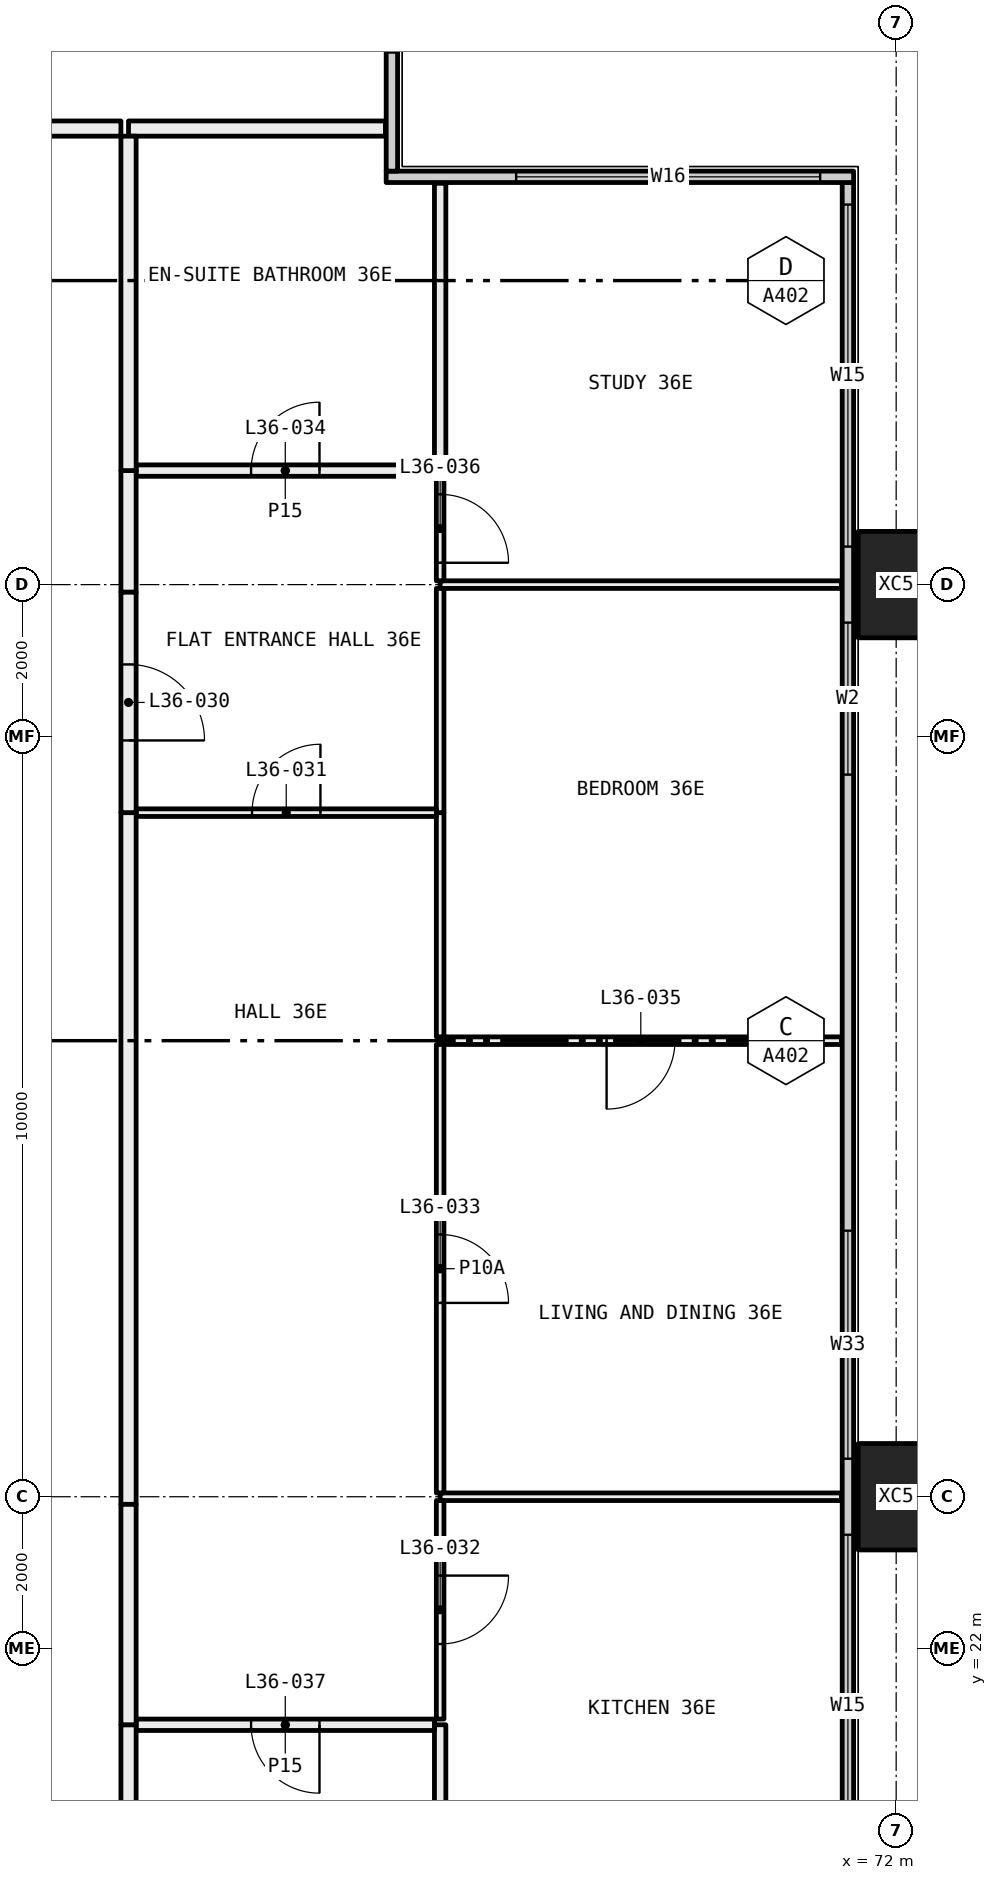
"""IFC4 building model, lengths in metres.
Left out: names, types, materials, properties, quantities, classifications, styles, units other than length and angle.
Written with IfcOpenShell. Run it as: python <this file> out.ifc"""

import sys

from ifc_helpers import new_model, si_unit, direction, frame, frame_2d, origin, origin_2d, place, context, subcontext, project, spatial, rectangle, hollow_rectangle, extrude, element, fill, save


model = new_model("IFC4")
c1 = context("Model", 3, precision=1e-05, world=origin(), true_north=direction((0.0, 1.0)))
c2 = subcontext(c1, "Body", "Model", "MODEL_VIEW")
j1 = project(units=[si_unit("LENGTHUNIT", "METRE"), si_unit("PLANEANGLEUNIT", "RADIAN")], contexts=[c1])
p1 = place(None, origin())
s1 = spatial("IfcSite", under=j1, at=p1, CompositionType="ELEMENT")
p2 = place(p1, origin())
s2 = spatial("IfcBuilding", under=s1, at=p2, CompositionType="ELEMENT")
p3 = place(p2, frame((0.0, 0.0, 138.0)))
s3 = spatial("IfcBuildingStorey", under=s2, at=p3, CompositionType="ELEMENT", Elevation=138.0)
for number, where, z_axis, x_axis in (
    (1, (72.0, 24.0, -0.4), (0.0, 0.0, 1.0), (0.0, 1.0, 0.0)),
    (2, (72.0, 36.0, -0.4), (0.0, 0.0, 1.0), (0.0, 1.0, 0.0)),
):
    element("IfcColumn", number, at=place(p3, frame(where, z_axis=z_axis, x_axis=x_axis)), inside=s3, PredefinedType="COLUMN", context=c2, shape_type="SweptSolid", body=[
        extrude(hollow_rectangle(XDim=1.4, YDim=1.0, WallThickness=0.055, at=origin_2d()), origin(), (0.0, 0.0, 1.0), 3.45),
    ])
p4 = place(p3, frame((71.365, 18.71, 0.0), z_axis=(0.0, 0.0, 1.0), x_axis=(0.0, 1.0, 0.0)))
e3 = element("IfcWall", 3, at=p4, inside=s3, PredefinedType="ELEMENTEDWALL", context=c2, shape_type="SweptSolid", body=[
    extrude(rectangle(XDim=22.58, YDim=0.15, at=frame_2d((11.29, 0.0))), origin(), (0.0, 0.0, 1.0), 3.05),
])
p5 = place(p4, frame((0.29, 0.0, 0.45)))
e4 = element("IfcOpeningElement", 4, at=p5, cuts=e3, PredefinedType="OPENING", context=c2, shape_type="SweptSolid", body=[
    extrude(rectangle(XDim=4.5, YDim=2.55, at=frame_2d((2.25, 1.275))), frame((0.0, 0.085, 0.0), z_axis=(0.0, -1.0, 0.0), x_axis=(1.0, 0.0, 0.0)), (0.0, 0.0, 1.0), 0.17),
])
p6 = place(p4, frame((5.79, 0.0, 0.45)))
e5 = element("IfcOpeningElement", 5, at=p6, cuts=e3, PredefinedType="OPENING", context=c2, shape_type="SweptSolid", body=[
    extrude(rectangle(XDim=3.0, YDim=2.55, at=frame_2d((1.5, 1.275))), frame((0.0, 0.085, 0.0), z_axis=(0.0, -1.0, 0.0), x_axis=(1.0, 0.0, 0.0)), (0.0, 0.0, 1.0), 0.17),
])
p7 = place(p4, frame((14.79, 0.0, 0.45)))
e6 = element("IfcOpeningElement", 6, at=p7, cuts=e3, PredefinedType="OPENING", context=c2, shape_type="SweptSolid", body=[
    extrude(rectangle(XDim=2.0, YDim=2.55, at=frame_2d((1.0, 1.275))), frame((0.0, 0.085, 0.0), z_axis=(0.0, -1.0, 0.0), x_axis=(1.0, 0.0, 0.0)), (0.0, 0.0, 1.0), 0.17),
])
p8 = place(p4, frame((17.79, 0.0, 0.45)))
e7 = element("IfcOpeningElement", 7, at=p8, cuts=e3, PredefinedType="OPENING", context=c2, shape_type="SweptSolid", body=[
    extrude(rectangle(XDim=4.5, YDim=2.55, at=frame_2d((2.25, 1.275))), frame((0.0, 0.085, 0.0), z_axis=(0.0, -1.0, 0.0), x_axis=(1.0, 0.0, 0.0)), (0.0, 0.0, 1.0), 0.17),
])
p9 = place(p3, frame((65.29, 41.365, 0.0), z_axis=(0.0, 0.0, 1.0), x_axis=(1.0, 0.0, 0.0)))
e8 = element("IfcWall", 8, at=p9, inside=s3, PredefinedType="ELEMENTEDWALL", context=c2, shape_type="SweptSolid", body=[
    extrude(rectangle(XDim=6.15, YDim=0.15, at=frame_2d((3.075, 0.0))), origin(), (0.0, 0.0, 1.0), 3.05),
])
p10 = place(p9, frame((1.71, 0.0, 0.45)))
e9 = element("IfcOpeningElement", 9, at=p10, cuts=e8, PredefinedType="OPENING", context=c2, shape_type="SweptSolid", body=[
    extrude(rectangle(XDim=4.0, YDim=2.55, at=frame_2d((2.0, 1.275))), frame((0.0, 0.085, 0.0), z_axis=(0.0, -1.0, 0.0), x_axis=(1.0, 0.0, 0.0)), (0.0, 0.0, 1.0), 0.17),
])
p11 = place(p3, frame((65.365, 41.44, 0.0), z_axis=(0.0, 0.0, 1.0), x_axis=(0.0, 1.0, 0.0)))
e10 = element("IfcWall", 10, at=p11, inside=s3, PredefinedType="ELEMENTEDWALL", context=c2, shape_type="SweptSolid", body=[
    extrude(rectangle(XDim=5.85, YDim=0.15, at=frame_2d((2.925, 0.0))), origin(), (0.0, 0.0, 1.0), 3.05),
])
p12 = place(p11, frame((1.56, 0.0, 0.45)))
e11 = element("IfcOpeningElement", 11, at=p12, cuts=e10, PredefinedType="OPENING", context=c2, shape_type="SweptSolid", body=[
    extrude(rectangle(XDim=4.0, YDim=2.55, at=frame_2d((2.0, 1.275))), frame((0.0, 0.085, 0.0), z_axis=(0.0, -1.0, 0.0), x_axis=(1.0, 0.0, 0.0)), (0.0, 0.0, 1.0), 0.17),
])
p13 = place(p3, frame((71.28, 24.0, 0.0), z_axis=(0.0, 0.0, 1.0), x_axis=(-1.0, 0.0, 0.0)))
e12 = element("IfcWall", 12, at=p13, inside=s3, PredefinedType="PARTITIONING", context=c2, shape_type="SweptSolid", body=[
    extrude(rectangle(XDim=5.28, YDim=0.1, at=frame_2d((2.64, 0.0))), origin(), (0.0, 0.0, 1.0), 2.45),
])
p14 = place(p3, frame((66.0, 21.0, 0.0), z_axis=(0.0, 0.0, 1.0), x_axis=(0.0, -1.0, 0.0)))
e13 = element("IfcWall", 13, at=p14, inside=s3, PredefinedType="PARTITIONING", context=c2, shape_type="SweptSolid", body=[
    extrude(rectangle(XDim=2.28, YDim=0.15, at=frame_2d((1.14, 0.0))), origin(), (0.0, 0.0, 1.0), 3.05),
])
p15 = place(p3, frame((66.0, 23.95, 0.0), z_axis=(0.0, 0.0, 1.0), x_axis=(0.0, -1.0, 0.0)))
e14 = element("IfcWall", 14, at=p15, inside=s3, PredefinedType="PARTITIONING", context=c2, shape_type="SweptSolid", body=[
    extrude(rectangle(XDim=2.875, YDim=0.1, at=frame_2d((1.438, 0.0))), origin(), (0.0, 0.0, 1.0), 2.45),
])
p16 = place(p15, frame((0.988, 0.0, 0.0)))
e15 = element("IfcOpeningElement", 15, at=p16, cuts=e14, PredefinedType="OPENING", context=c2, shape_type="SweptSolid", body=[
    extrude(rectangle(XDim=0.9, YDim=2.1, at=frame_2d((0.45, 1.05))), frame((0.0, 0.06, 0.0), z_axis=(0.0, -1.0, 0.0), x_axis=(1.0, 0.0, 0.0)), (0.0, 0.0, 1.0), 0.12),
])
p17 = place(p3, frame((71.28, 30.0, 0.0), z_axis=(0.0, 0.0, 1.0), x_axis=(-1.0, 0.0, 0.0)))
e16 = element("IfcWall", 16, at=p17, inside=s3, PredefinedType="PARTITIONING", context=c2, shape_type="SweptSolid", body=[
    extrude(rectangle(XDim=5.28, YDim=0.1, at=frame_2d((2.64, 0.0))), origin(), (0.0, 0.0, 1.0), 3.05),
])
p18 = place(p17, frame((2.19, 0.0, 0.0)))
e17 = element("IfcOpeningElement", 17, at=p18, cuts=e16, PredefinedType="OPENING", context=c2, shape_type="SweptSolid", body=[
    extrude(rectangle(XDim=0.9, YDim=2.1, at=frame_2d((0.45, 1.05))), frame((0.0, 0.06, 0.0), z_axis=(0.0, -1.0, 0.0), x_axis=(1.0, 0.0, 0.0)), (0.0, 0.0, 1.0), 0.12),
])
p19 = place(p3, frame((66.0, 29.95, 0.0), z_axis=(0.0, 0.0, 1.0), x_axis=(0.0, -1.0, 0.0)))
e18 = element("IfcWall", 18, at=p19, inside=s3, PredefinedType="PARTITIONING", context=c2, shape_type="SweptSolid", body=[
    extrude(rectangle(XDim=5.9, YDim=0.1, at=frame_2d((2.95, 0.0))), origin(), (0.0, 0.0, 1.0), 2.45),
])
p20 = place(p19, frame((2.5, 0.0, 0.0)))
e19 = element("IfcOpeningElement", 19, at=p20, cuts=e18, PredefinedType="OPENING", context=c2, shape_type="SweptSolid", body=[
    extrude(rectangle(XDim=0.9, YDim=2.1, at=frame_2d((0.45, 1.05))), frame((0.0, 0.06, 0.0), z_axis=(0.0, -1.0, 0.0), x_axis=(1.0, 0.0, 0.0)), (0.0, 0.0, 1.0), 0.12),
])
p21 = place(p3, frame((71.28, 36.0, 0.0), z_axis=(0.0, 0.0, 1.0), x_axis=(-1.0, 0.0, 0.0)))
e20 = element("IfcWall", 20, at=p21, inside=s3, PredefinedType="PARTITIONING", context=c2, shape_type="SweptSolid", body=[
    extrude(rectangle(XDim=5.28, YDim=0.1, at=frame_2d((2.64, 0.0))), origin(), (0.0, 0.0, 1.0), 2.45),
])
p22 = place(p3, frame((66.0, 33.0, 0.0), z_axis=(0.0, 0.0, 1.0), x_axis=(0.0, -1.0, 0.0)))
e21 = element("IfcWall", 21, at=p22, inside=s3, PredefinedType="PARTITIONING", context=c2, shape_type="SweptSolid", body=[
    extrude(rectangle(XDim=2.95, YDim=0.1, at=frame_2d((1.475, 0.0))), origin(), (0.0, 0.0, 1.0), 3.05),
])
p23 = place(p3, frame((66.0, 35.95, 0.0), z_axis=(0.0, 0.0, 1.0), x_axis=(0.0, -1.0, 0.0)))
e22 = element("IfcWall", 22, at=p23, inside=s3, PredefinedType="PARTITIONING", context=c2, shape_type="SweptSolid", body=[
    extrude(rectangle(XDim=2.95, YDim=0.1, at=frame_2d((1.475, 0.0))), origin(), (0.0, 0.0, 1.0), 2.45),
])
p24 = place(p3, frame((66.0, 37.425, 0.0), z_axis=(0.0, 0.0, 1.0), x_axis=(0.0, -1.0, 0.0)))
e23 = element("IfcWall", 23, at=p24, inside=s3, PredefinedType="PARTITIONING", context=c2, shape_type="SweptSolid", body=[
    extrude(rectangle(XDim=1.375, YDim=0.1, at=frame_2d((0.688, 0.0))), origin(), (0.0, 0.0, 1.0), 2.45),
])
p25 = place(p24, frame((0.238, 0.0, 0.0)))
e24 = element("IfcOpeningElement", 24, at=p25, cuts=e23, PredefinedType="OPENING", context=c2, shape_type="SweptSolid", body=[
    extrude(rectangle(XDim=0.9, YDim=2.1, at=frame_2d((0.45, 1.05))), frame((0.0, 0.06, 0.0), z_axis=(0.0, -1.0, 0.0), x_axis=(1.0, 0.0, 0.0)), (0.0, 0.0, 1.0), 0.12),
])
p26 = place(p3, frame((66.0, 41.28, 0.0), z_axis=(0.0, 0.0, 1.0), x_axis=(0.0, -1.0, 0.0)))
e25 = element("IfcWall", 25, at=p26, inside=s3, PredefinedType="PARTITIONING", context=c2, shape_type="SweptSolid", body=[
    extrude(rectangle(XDim=3.78, YDim=0.15, at=frame_2d((1.89, 0.0))), origin(), (0.0, 0.0, 1.0), 3.05),
])
p27 = place(p3, frame((65.925, 21.0, 0.0), z_axis=(0.0, 0.0, 1.0), x_axis=(-1.0, 0.0, 0.0)))
e26 = element("IfcWall", 26, at=p27, inside=s3, PredefinedType="PARTITIONING", context=c2, shape_type="SweptSolid", body=[
    extrude(rectangle(XDim=3.925, YDim=0.15, at=frame_2d((1.962, 0.0))), origin(), (0.0, 0.0, 1.0), 3.05),
])
p28 = place(p27, frame((1.512, 0.0, 0.0)))
e27 = element("IfcOpeningElement", 27, at=p28, cuts=e26, PredefinedType="OPENING", context=c2, shape_type="SweptSolid", body=[
    extrude(rectangle(XDim=0.9, YDim=2.1, at=frame_2d((0.45, 1.05))), frame((0.0, 0.085, 0.0), z_axis=(0.0, -1.0, 0.0), x_axis=(1.0, 0.0, 0.0)), (0.0, 0.0, 1.0), 0.17),
])
p29 = place(p3, frame((61.9, 21.0, 0.0), z_axis=(0.0, 0.0, 1.0), x_axis=(0.0, -1.0, 0.0)))
e28 = element("IfcWall", 28, at=p29, inside=s3, PredefinedType="PARTITIONING", context=c2, shape_type="SweptSolid", body=[
    extrude(rectangle(XDim=2.9, YDim=0.2, at=frame_2d((1.45, 0.0))), origin(), (0.0, 0.0, 1.0), 3.05),
])
p30 = place(p3, frame((65.95, 33.0, 0.0), z_axis=(0.0, 0.0, 1.0), x_axis=(-1.0, 0.0, 0.0)))
e29 = element("IfcWall", 29, at=p30, inside=s3, PredefinedType="PARTITIONING", context=c2, shape_type="SweptSolid", body=[
    extrude(rectangle(XDim=3.95, YDim=0.1, at=frame_2d((1.975, 0.0))), origin(), (0.0, 0.0, 1.0), 3.05),
])
p31 = place(p30, frame((1.525, 0.0, 0.0)))
e30 = element("IfcOpeningElement", 30, at=p31, cuts=e29, PredefinedType="OPENING", context=c2, shape_type="SweptSolid", body=[
    extrude(rectangle(XDim=0.9, YDim=2.1, at=frame_2d((0.45, 1.05))), frame((0.0, 0.06, 0.0), z_axis=(0.0, -1.0, 0.0), x_axis=(1.0, 0.0, 0.0)), (0.0, 0.0, 1.0), 0.12),
])
p32 = place(p3, frame((61.9, 33.0, 0.0), z_axis=(0.0, 0.0, 1.0), x_axis=(0.0, -1.0, 0.0)))
e31 = element("IfcWall", 31, at=p32, inside=s3, PredefinedType="PARTITIONING", context=c2, shape_type="SweptSolid", body=[
    extrude(rectangle(XDim=9.1, YDim=0.2, at=frame_2d((4.55, 0.0))), origin(), (0.0, 0.0, 1.0), 2.45),
])
p33 = place(p3, frame((61.9, 23.9, 0.0), z_axis=(0.0, 0.0, 1.0), x_axis=(0.0, -1.0, 0.0)))
e32 = element("IfcWall", 32, at=p33, inside=s3, PredefinedType="PARTITIONING", context=c2, shape_type="SweptSolid", body=[
    extrude(rectangle(XDim=2.9, YDim=0.2, at=frame_2d((1.45, 0.0))), origin(), (0.0, 0.0, 1.0), 3.05),
])
p34 = place(p3, frame((65.925, 37.5, 0.0), z_axis=(0.0, 0.0, 1.0), x_axis=(-1.0, 0.0, 0.0)))
e33 = element("IfcWall", 33, at=p34, inside=s3, PredefinedType="PARTITIONING", context=c2, shape_type="SweptSolid", body=[
    extrude(rectangle(XDim=3.925, YDim=0.15, at=frame_2d((1.962, 0.0))), origin(), (0.0, 0.0, 1.0), 3.05),
])
p35 = place(p34, frame((1.512, 0.0, 0.0)))
e34 = element("IfcOpeningElement", 34, at=p35, cuts=e33, PredefinedType="OPENING", context=c2, shape_type="SweptSolid", body=[
    extrude(rectangle(XDim=0.9, YDim=2.1, at=frame_2d((0.45, 1.05))), frame((0.0, 0.085, 0.0), z_axis=(0.0, -1.0, 0.0), x_axis=(1.0, 0.0, 0.0)), (0.0, 0.0, 1.0), 0.17),
])
p36 = place(p3, frame((61.9, 37.5, 0.0), z_axis=(0.0, 0.0, 1.0), x_axis=(0.0, -1.0, 0.0)))
e35 = element("IfcWall", 35, at=p36, inside=s3, PredefinedType="PARTITIONING", context=c2, shape_type="SweptSolid", body=[
    extrude(rectangle(XDim=1.6, YDim=0.2, at=frame_2d((0.8, 0.0))), origin(), (0.0, 0.0, 1.0), 2.45),
])
p37 = place(p3, frame((61.9, 35.9, 0.0), z_axis=(0.0, 0.0, 1.0), x_axis=(0.0, -1.0, 0.0)))
e36 = element("IfcWall", 36, at=p37, inside=s3, PredefinedType="PARTITIONING", context=c2, shape_type="SweptSolid", body=[
    extrude(rectangle(XDim=2.9, YDim=0.2, at=frame_2d((1.45, 0.0))), origin(), (0.0, 0.0, 1.0), 3.05),
])
p38 = place(p37, frame((0.95, 0.0, 0.0)))
e37 = element("IfcOpeningElement", 37, at=p38, cuts=e36, PredefinedType="OPENING", context=c2, shape_type="SweptSolid", body=[
    extrude(rectangle(XDim=1.0, YDim=2.1, at=frame_2d((0.5, 1.05))), frame((0.0, 0.11, 0.0), z_axis=(0.0, -1.0, 0.0), x_axis=(1.0, 0.0, 0.0)), (0.0, 0.0, 1.0), 0.22),
])
p39 = place(p3, frame((65.28, 42.0, 0.0), z_axis=(0.0, 0.0, 1.0), x_axis=(-1.0, 0.0, 0.0)))
e38 = element("IfcWall", 38, at=p39, inside=s3, PredefinedType="PARTITIONING", context=c2, shape_type="SweptSolid", body=[
    extrude(rectangle(XDim=3.38, YDim=0.2, at=frame_2d((1.69, 0.0))), origin(), (0.0, 0.0, 1.0), 3.05),
])
p40 = place(p3, frame((61.9, 41.9, 0.0), z_axis=(0.0, 0.0, 1.0), x_axis=(0.0, -1.0, 0.0)))
e39 = element("IfcWall", 39, at=p40, inside=s3, PredefinedType="PARTITIONING", context=c2, shape_type="SweptSolid", body=[
    extrude(rectangle(XDim=4.4, YDim=0.2, at=frame_2d((2.2, 0.0))), origin(), (0.0, 0.0, 1.0), 3.05),
])
p41 = place(p3, frame((60.0, 42.0, 0.0), z_axis=(0.0, 0.0, 1.0), x_axis=(1.0, 0.0, 0.0)))
e40 = element("IfcWall", 40, at=p41, inside=s3, PredefinedType="PARTITIONING", context=c2, shape_type="SweptSolid", body=[
    extrude(rectangle(XDim=1.8, YDim=0.2, at=frame_2d((0.9, 0.0))), origin(), (0.0, 0.0, 1.0), 3.05),
])
p42 = place(p5, origin())
e41 = element("IfcWindow", 41, at=p42, inside=s3, PartitioningType="SINGLE_PANEL", PredefinedType="WINDOW", context=c2, shape_type="SweptSolid", body=[
    extrude(rectangle(XDim=4.5, YDim=2.55, at=frame_2d((2.25, 1.275))), frame((0.0, 0.03, 0.0), z_axis=(0.0, -1.0, 0.0), x_axis=(1.0, 0.0, 0.0)), (0.0, 0.0, 1.0), 0.06),
])
fill(e4, e41)
p43 = place(p6, origin())
e42 = element("IfcWindow", 42, at=p43, inside=s3, PartitioningType="SINGLE_PANEL", PredefinedType="WINDOW", context=c2, shape_type="SweptSolid", body=[
    extrude(rectangle(XDim=3.0, YDim=2.55, at=frame_2d((1.5, 1.275))), frame((0.0, 0.03, 0.0), z_axis=(0.0, -1.0, 0.0), x_axis=(1.0, 0.0, 0.0)), (0.0, 0.0, 1.0), 0.06),
])
fill(e5, e42)
p44 = place(p7, origin())
e43 = element("IfcWindow", 43, at=p44, inside=s3, PartitioningType="SINGLE_PANEL", PredefinedType="WINDOW", context=c2, shape_type="SweptSolid", body=[
    extrude(rectangle(XDim=2.0, YDim=2.55, at=frame_2d((1.0, 1.275))), frame((0.0, 0.03, 0.0), z_axis=(0.0, -1.0, 0.0), x_axis=(1.0, 0.0, 0.0)), (0.0, 0.0, 1.0), 0.06),
])
fill(e6, e43)
p45 = place(p8, origin())
e44 = element("IfcWindow", 44, at=p45, inside=s3, PartitioningType="SINGLE_PANEL", PredefinedType="WINDOW", context=c2, shape_type="SweptSolid", body=[
    extrude(rectangle(XDim=4.5, YDim=2.55, at=frame_2d((2.25, 1.275))), frame((0.0, 0.03, 0.0), z_axis=(0.0, -1.0, 0.0), x_axis=(1.0, 0.0, 0.0)), (0.0, 0.0, 1.0), 0.06),
])
fill(e7, e44)
p46 = place(p10, origin())
e45 = element("IfcWindow", 45, at=p46, inside=s3, PartitioningType="SINGLE_PANEL", PredefinedType="WINDOW", context=c2, shape_type="SweptSolid", body=[
    extrude(rectangle(XDim=4.0, YDim=2.55, at=frame_2d((2.0, 1.275))), frame((0.0, 0.03, 0.0), z_axis=(0.0, -1.0, 0.0), x_axis=(1.0, 0.0, 0.0)), (0.0, 0.0, 1.0), 0.06),
])
fill(e9, e45)
p47 = place(p38, origin())
e46 = element("IfcDoor", 46, at=p47, inside=s3, OperationType="SINGLE_SWING_LEFT", PredefinedType="DOOR", context=c2, shape_type="SweptSolid", body=[
    extrude(rectangle(XDim=1.0, YDim=2.1, at=frame_2d((0.5, 1.05))), frame((0.0, 0.025, 0.0), z_axis=(0.0, -1.0, 0.0), x_axis=(1.0, 0.0, 0.0)), (0.0, 0.0, 1.0), 0.05),
])
fill(e37, e46)
p48 = place(p31, frame((0.9, 0.0, 0.0), x_axis=(-1.0, 0.0, 0.0)))
e47 = element("IfcDoor", 47, at=p48, inside=s3, OperationType="SINGLE_SWING_LEFT", PredefinedType="DOOR", context=c2, shape_type="SweptSolid", body=[
    extrude(rectangle(XDim=0.9, YDim=2.1, at=frame_2d((0.45, 1.05))), frame((0.0, 0.025, 0.0), z_axis=(0.0, -1.0, 0.0), x_axis=(1.0, 0.0, 0.0)), (0.0, 0.0, 1.0), 0.05),
])
fill(e30, e47)
p49 = place(p16, origin())
e48 = element("IfcDoor", 48, at=p49, inside=s3, OperationType="SINGLE_SWING_RIGHT", PredefinedType="DOOR", context=c2, shape_type="SweptSolid", body=[
    extrude(rectangle(XDim=0.9, YDim=2.1, at=frame_2d((0.45, 1.05))), frame((0.0, 0.025, 0.0), z_axis=(0.0, -1.0, 0.0), x_axis=(1.0, 0.0, 0.0)), (0.0, 0.0, 1.0), 0.05),
])
fill(e15, e48)
p50 = place(p20, origin())
e49 = element("IfcDoor", 49, at=p50, inside=s3, OperationType="SINGLE_SWING_LEFT", PredefinedType="DOOR", context=c2, shape_type="SweptSolid", body=[
    extrude(rectangle(XDim=0.9, YDim=2.1, at=frame_2d((0.45, 1.05))), frame((0.0, 0.025, 0.0), z_axis=(0.0, -1.0, 0.0), x_axis=(1.0, 0.0, 0.0)), (0.0, 0.0, 1.0), 0.05),
])
fill(e19, e49)
p51 = place(p35, frame((0.9, 0.0, 0.0), x_axis=(-1.0, 0.0, 0.0)))
e50 = element("IfcDoor", 50, at=p51, inside=s3, OperationType="SINGLE_SWING_LEFT", PredefinedType="DOOR", context=c2, shape_type="SweptSolid", body=[
    extrude(rectangle(XDim=0.9, YDim=2.1, at=frame_2d((0.45, 1.05))), frame((0.0, 0.025, 0.0), z_axis=(0.0, -1.0, 0.0), x_axis=(1.0, 0.0, 0.0)), (0.0, 0.0, 1.0), 0.05),
])
fill(e34, e50)
p52 = place(p18, origin())
e51 = element("IfcDoor", 51, at=p52, inside=s3, OperationType="SINGLE_SWING_LEFT", PredefinedType="DOOR", context=c2, shape_type="SweptSolid", body=[
    extrude(rectangle(XDim=0.9, YDim=2.1, at=frame_2d((0.45, 1.05))), frame((0.0, 0.025, 0.0), z_axis=(0.0, -1.0, 0.0), x_axis=(1.0, 0.0, 0.0)), (0.0, 0.0, 1.0), 0.05),
])
fill(e17, e51)
p53 = place(p25, origin())
e52 = element("IfcDoor", 52, at=p53, inside=s3, OperationType="SINGLE_SWING_LEFT", PredefinedType="DOOR", context=c2, shape_type="SweptSolid", body=[
    extrude(rectangle(XDim=0.9, YDim=2.1, at=frame_2d((0.45, 1.05))), frame((0.0, 0.025, 0.0), z_axis=(0.0, -1.0, 0.0), x_axis=(1.0, 0.0, 0.0)), (0.0, 0.0, 1.0), 0.05),
])
fill(e24, e52)
p54 = place(p28, origin())
e53 = element("IfcDoor", 53, at=p54, inside=s3, OperationType="SINGLE_SWING_RIGHT", PredefinedType="DOOR", context=c2, shape_type="SweptSolid", body=[
    extrude(rectangle(XDim=0.9, YDim=2.1, at=frame_2d((0.45, 1.05))), frame((0.0, 0.025, 0.0), z_axis=(0.0, -1.0, 0.0), x_axis=(1.0, 0.0, 0.0)), (0.0, 0.0, 1.0), 0.05),
])
fill(e27, e53)
save(model, sys.argv[1])
